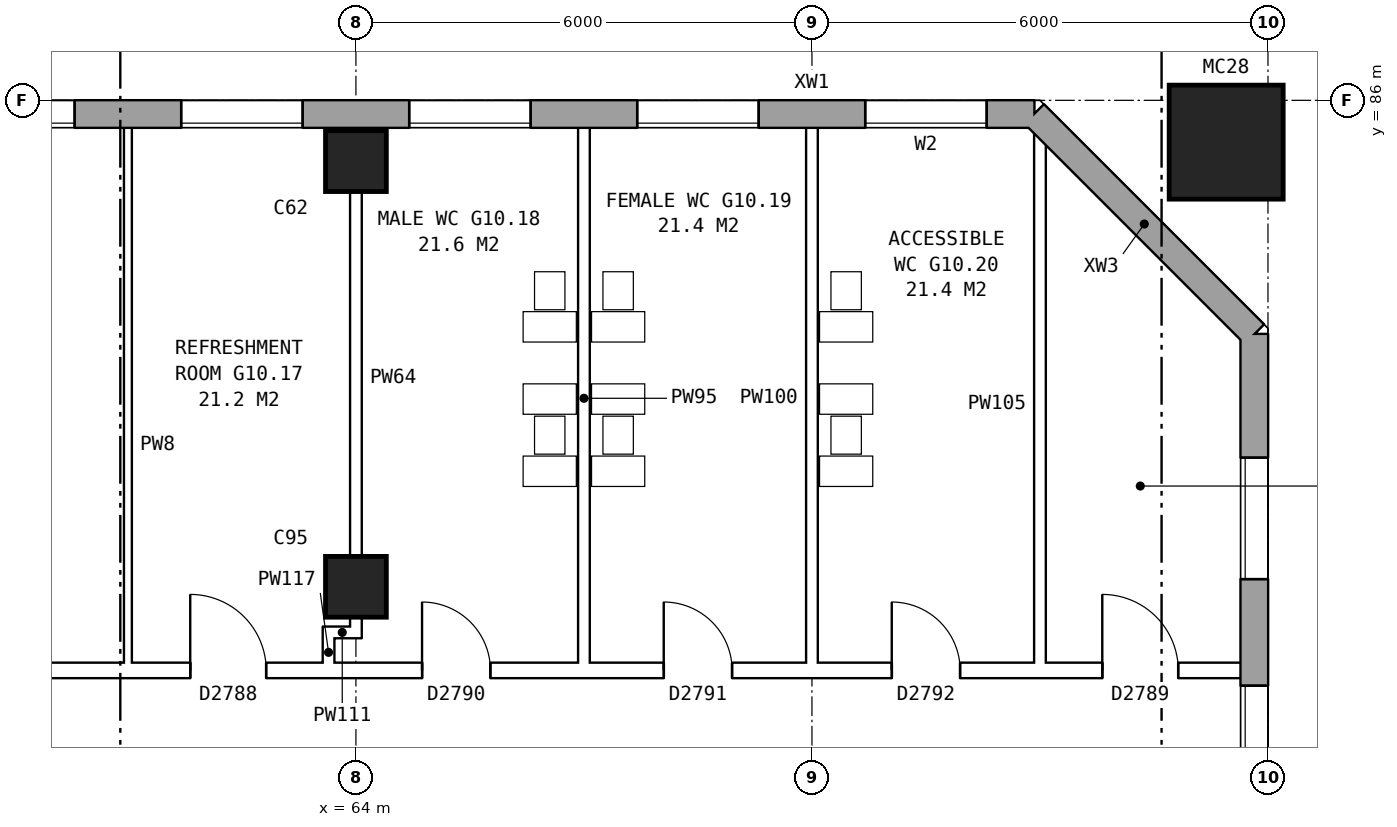
"""IFC4 building model, lengths in metres.
Left out: names, types, materials, properties, quantities, classifications, styles, units other than length and angle.
Written with IfcOpenShell. Run it as: python <this file> out.ifc"""

import sys

from ifc_helpers import new_model, si_unit, direction, frame, frame_2d, origin, origin_2d, place, context, subcontext, project, spatial, rectangle, hollow_rectangle, extrude, element, fill, save


model = new_model("IFC4")
c1 = context("Model", 3, precision=1e-05, world=origin(), true_north=direction((0.0, 1.0)))
c2 = subcontext(c1, "Body", "Model", "MODEL_VIEW")
j1 = project(units=[si_unit("LENGTHUNIT", "METRE"), si_unit("PLANEANGLEUNIT", "RADIAN")], contexts=[c1])
p1 = place(None, origin())
s1 = spatial("IfcSite", under=j1, at=p1, CompositionType="ELEMENT")
p2 = place(p1, origin())
s2 = spatial("IfcBuilding", under=s1, at=p2, CompositionType="ELEMENT")
p3 = place(p2, frame((0.0, 0.0, 38.1)))
s3 = spatial("IfcBuildingStorey", under=s2, at=p3, CompositionType="ELEMENT", Elevation=38.1)
for number, where, z_axis, x_axis in (
    (1, (64.0, 79.6, 0.0), (0.0, 0.0, 1.0), (1.0, 0.0, 0.0)),
    (2, (64.0, 85.2, 0.0), (0.0, 0.0, 1.0), (1.0, 0.0, 0.0)),
):
    element("IfcColumn", number, at=place(p3, frame(where, z_axis=z_axis, x_axis=x_axis)), inside=s3, PredefinedType="COLUMN", context=c2, shape_type="SweptSolid", body=[
        extrude(rectangle(XDim=0.8, YDim=0.8, at=origin_2d()), origin(), (0.0, 0.0, 1.0), 5.6),
    ])
p4 = place(p3, frame((75.45, 85.45, 0.0), z_axis=(0.0, 0.0, 1.0), x_axis=(1.0, 0.0, 0.0)))
e3 = element("IfcColumn", 3, at=p4, inside=s3, PredefinedType="COLUMN", context=c2, shape_type="SweptSolid", body=[
    extrude(hollow_rectangle(XDim=1.5, YDim=1.5, WallThickness=0.08, at=origin_2d()), origin(), (0.0, 0.0, 1.0), 6.2),
])
p5 = place(p3, frame((75.82, 57.075, 0.0), z_axis=(0.0, 0.0, 1.0), x_axis=(0.0, 1.0, 0.0)))
e4 = element("IfcWall", 4, at=p5, inside=s3, PredefinedType="STANDARD", context=c2, shape_type="SweptSolid", body=[
    extrude(rectangle(XDim=25.851, YDim=0.36, at=frame_2d((12.925, 0.0))), origin(), (0.0, 0.0, 1.0), 5.6),
])
p6 = place(p5, frame((1.625, 0.0, 0.15)))
e5 = element("IfcOpeningElement", 5, at=p6, cuts=e4, PredefinedType="OPENING", context=c2, shape_type="SweptSolid", body=[
    extrude(rectangle(XDim=1.6, YDim=2.4, at=frame_2d((0.8, 1.2))), frame((0.0, 0.19, 0.0), z_axis=(0.0, -1.0, 0.0), x_axis=(1.0, 0.0, 0.0)), (0.0, 0.0, 1.0), 0.38),
])
p7 = place(p5, frame((4.625, 0.0, 0.15)))
e6 = element("IfcOpeningElement", 6, at=p7, cuts=e4, PredefinedType="OPENING", context=c2, shape_type="SweptSolid", body=[
    extrude(rectangle(XDim=1.6, YDim=2.4, at=frame_2d((0.8, 1.2))), frame((0.0, 0.19, 0.0), z_axis=(0.0, -1.0, 0.0), x_axis=(1.0, 0.0, 0.0)), (0.0, 0.0, 1.0), 0.38),
])
p8 = place(p5, frame((19.625, 0.0, 0.15)))
e7 = element("IfcOpeningElement", 7, at=p8, cuts=e4, PredefinedType="OPENING", context=c2, shape_type="SweptSolid", body=[
    extrude(rectangle(XDim=1.6, YDim=2.4, at=frame_2d((0.8, 1.2))), frame((0.0, 0.19, 0.0), z_axis=(0.0, -1.0, 0.0), x_axis=(1.0, 0.0, 0.0)), (0.0, 0.0, 1.0), 0.38),
])
p9 = place(p5, frame((22.625, 0.0, 0.15)))
e8 = element("IfcOpeningElement", 8, at=p9, cuts=e4, PredefinedType="OPENING", context=c2, shape_type="SweptSolid", body=[
    extrude(rectangle(XDim=1.6, YDim=2.4, at=frame_2d((0.8, 1.2))), frame((0.0, 0.19, 0.0), z_axis=(0.0, -1.0, 0.0), x_axis=(1.0, 0.0, 0.0)), (0.0, 0.0, 1.0), 0.38),
])
p10 = place(p3, frame((75.82, 82.925, 0.0), z_axis=(0.0, 0.0, 1.0), x_axis=(-0.707106781187, 0.707106781187, 0.0)))
e9 = element("IfcWall", 9, at=p10, inside=s3, PredefinedType="STANDARD", context=c2, shape_type="SweptSolid", body=[
    extrude(rectangle(XDim=4.094, YDim=0.36, at=frame_2d((2.047, 0.0))), origin(), (0.0, 0.0, 1.0), 5.6),
])
p11 = place(p3, frame((72.925, 85.82, 0.0), z_axis=(0.0, 0.0, 1.0), x_axis=(-1.0, 0.0, 0.0)))
e10 = element("IfcWall", 10, at=p11, inside=s3, PredefinedType="STANDARD", context=c2, shape_type="SweptSolid", body=[
    extrude(rectangle(XDim=48.351, YDim=0.36, at=frame_2d((24.175, 0.0))), origin(), (0.0, 0.0, 1.0), 5.6),
])
p12 = place(p11, frame((0.625, 0.0, 0.15)))
e11 = element("IfcOpeningElement", 11, at=p12, cuts=e10, PredefinedType="OPENING", context=c2, shape_type="SweptSolid", body=[
    extrude(rectangle(XDim=1.6, YDim=2.4, at=frame_2d((0.8, 1.2))), frame((0.0, 0.19, 0.0), z_axis=(0.0, -1.0, 0.0), x_axis=(1.0, 0.0, 0.0)), (0.0, 0.0, 1.0), 0.38),
])
p13 = place(p11, frame((3.625, 0.0, 0.15)))
e12 = element("IfcOpeningElement", 12, at=p13, cuts=e10, PredefinedType="OPENING", context=c2, shape_type="SweptSolid", body=[
    extrude(rectangle(XDim=1.6, YDim=2.4, at=frame_2d((0.8, 1.2))), frame((0.0, 0.19, 0.0), z_axis=(0.0, -1.0, 0.0), x_axis=(1.0, 0.0, 0.0)), (0.0, 0.0, 1.0), 0.38),
])
p14 = place(p11, frame((6.625, 0.0, 0.15)))
e13 = element("IfcOpeningElement", 13, at=p14, cuts=e10, PredefinedType="OPENING", context=c2, shape_type="SweptSolid", body=[
    extrude(rectangle(XDim=1.6, YDim=2.4, at=frame_2d((0.8, 1.2))), frame((0.0, 0.19, 0.0), z_axis=(0.0, -1.0, 0.0), x_axis=(1.0, 0.0, 0.0)), (0.0, 0.0, 1.0), 0.38),
])
p15 = place(p11, frame((9.625, 0.0, 0.15)))
e14 = element("IfcOpeningElement", 14, at=p15, cuts=e10, PredefinedType="OPENING", context=c2, shape_type="SweptSolid", body=[
    extrude(rectangle(XDim=1.6, YDim=2.4, at=frame_2d((0.8, 1.2))), frame((0.0, 0.19, 0.0), z_axis=(0.0, -1.0, 0.0), x_axis=(1.0, 0.0, 0.0)), (0.0, 0.0, 1.0), 0.38),
])
p16 = place(p11, frame((12.625, 0.0, 0.15)))
e15 = element("IfcOpeningElement", 15, at=p16, cuts=e10, PredefinedType="OPENING", context=c2, shape_type="SweptSolid", body=[
    extrude(rectangle(XDim=1.6, YDim=2.4, at=frame_2d((0.8, 1.2))), frame((0.0, 0.19, 0.0), z_axis=(0.0, -1.0, 0.0), x_axis=(1.0, 0.0, 0.0)), (0.0, 0.0, 1.0), 0.38),
])
p17 = place(p11, frame((15.625, 0.0, 0.15)))
e16 = element("IfcOpeningElement", 16, at=p17, cuts=e10, PredefinedType="OPENING", context=c2, shape_type="SweptSolid", body=[
    extrude(rectangle(XDim=1.6, YDim=2.4, at=frame_2d((0.8, 1.2))), frame((0.0, 0.19, 0.0), z_axis=(0.0, -1.0, 0.0), x_axis=(1.0, 0.0, 0.0)), (0.0, 0.0, 1.0), 0.38),
])
p18 = place(p11, frame((18.625, 0.0, 0.15)))
e17 = element("IfcOpeningElement", 17, at=p18, cuts=e10, PredefinedType="OPENING", context=c2, shape_type="SweptSolid", body=[
    extrude(rectangle(XDim=1.6, YDim=2.4, at=frame_2d((0.8, 1.2))), frame((0.0, 0.19, 0.0), z_axis=(0.0, -1.0, 0.0), x_axis=(1.0, 0.0, 0.0)), (0.0, 0.0, 1.0), 0.38),
])
p19 = place(p11, frame((21.625, 0.0, 0.15)))
e18 = element("IfcOpeningElement", 18, at=p19, cuts=e10, PredefinedType="OPENING", context=c2, shape_type="SweptSolid", body=[
    extrude(rectangle(XDim=1.6, YDim=2.4, at=frame_2d((0.8, 1.2))), frame((0.0, 0.19, 0.0), z_axis=(0.0, -1.0, 0.0), x_axis=(1.0, 0.0, 0.0)), (0.0, 0.0, 1.0), 0.38),
])
p20 = place(p11, frame((24.625, 0.0, 0.15)))
e19 = element("IfcOpeningElement", 19, at=p20, cuts=e10, PredefinedType="OPENING", context=c2, shape_type="SweptSolid", body=[
    extrude(rectangle(XDim=1.6, YDim=2.4, at=frame_2d((0.8, 1.2))), frame((0.0, 0.19, 0.0), z_axis=(0.0, -1.0, 0.0), x_axis=(1.0, 0.0, 0.0)), (0.0, 0.0, 1.0), 0.38),
])
p21 = place(p11, frame((27.625, 0.0, 0.15)))
e20 = element("IfcOpeningElement", 20, at=p21, cuts=e10, PredefinedType="OPENING", context=c2, shape_type="SweptSolid", body=[
    extrude(rectangle(XDim=1.6, YDim=2.4, at=frame_2d((0.8, 1.2))), frame((0.0, 0.19, 0.0), z_axis=(0.0, -1.0, 0.0), x_axis=(1.0, 0.0, 0.0)), (0.0, 0.0, 1.0), 0.38),
])
p22 = place(p11, frame((30.625, 0.0, 0.15)))
e21 = element("IfcOpeningElement", 21, at=p22, cuts=e10, PredefinedType="OPENING", context=c2, shape_type="SweptSolid", body=[
    extrude(rectangle(XDim=1.6, YDim=2.4, at=frame_2d((0.8, 1.2))), frame((0.0, 0.19, 0.0), z_axis=(0.0, -1.0, 0.0), x_axis=(1.0, 0.0, 0.0)), (0.0, 0.0, 1.0), 0.38),
])
p23 = place(p11, frame((33.625, 0.0, 0.15)))
e22 = element("IfcOpeningElement", 22, at=p23, cuts=e10, PredefinedType="OPENING", context=c2, shape_type="SweptSolid", body=[
    extrude(rectangle(XDim=1.6, YDim=2.4, at=frame_2d((0.8, 1.2))), frame((0.0, 0.19, 0.0), z_axis=(0.0, -1.0, 0.0), x_axis=(1.0, 0.0, 0.0)), (0.0, 0.0, 1.0), 0.38),
])
p24 = place(p11, frame((36.625, 0.0, 0.15)))
e23 = element("IfcOpeningElement", 23, at=p24, cuts=e10, PredefinedType="OPENING", context=c2, shape_type="SweptSolid", body=[
    extrude(rectangle(XDim=1.6, YDim=2.4, at=frame_2d((0.8, 1.2))), frame((0.0, 0.19, 0.0), z_axis=(0.0, -1.0, 0.0), x_axis=(1.0, 0.0, 0.0)), (0.0, 0.0, 1.0), 0.38),
])
p25 = place(p11, frame((39.625, 0.0, 0.15)))
e24 = element("IfcOpeningElement", 24, at=p25, cuts=e10, PredefinedType="OPENING", context=c2, shape_type="SweptSolid", body=[
    extrude(rectangle(XDim=1.6, YDim=2.4, at=frame_2d((0.8, 1.2))), frame((0.0, 0.19, 0.0), z_axis=(0.0, -1.0, 0.0), x_axis=(1.0, 0.0, 0.0)), (0.0, 0.0, 1.0), 0.38),
])
p26 = place(p11, frame((42.625, 0.0, 0.15)))
e25 = element("IfcOpeningElement", 25, at=p26, cuts=e10, PredefinedType="OPENING", context=c2, shape_type="SweptSolid", body=[
    extrude(rectangle(XDim=1.6, YDim=2.4, at=frame_2d((0.8, 1.2))), frame((0.0, 0.19, 0.0), z_axis=(0.0, -1.0, 0.0), x_axis=(1.0, 0.0, 0.0)), (0.0, 0.0, 1.0), 0.38),
])
p27 = place(p11, frame((45.625, 0.0, 0.15)))
e26 = element("IfcOpeningElement", 26, at=p27, cuts=e10, PredefinedType="OPENING", context=c2, shape_type="SweptSolid", body=[
    extrude(rectangle(XDim=1.6, YDim=2.4, at=frame_2d((0.8, 1.2))), frame((0.0, 0.19, 0.0), z_axis=(0.0, -1.0, 0.0), x_axis=(1.0, 0.0, 0.0)), (0.0, 0.0, 1.0), 0.38),
])
p28 = place(p3, frame((24.9, 78.5, 0.0), z_axis=(0.0, 0.0, 1.0), x_axis=(1.0, 0.0, 0.0)))
e27 = element("IfcWall", 27, at=p28, inside=s3, PredefinedType="PARTITIONING", context=c2, shape_type="SweptSolid", body=[
    extrude(rectangle(XDim=50.86, YDim=0.2, at=frame_2d((25.43, 0.0))), origin(), (0.0, 0.0, 1.0), 5.6),
])
p29 = place(p28, frame((3.5, 0.0, 0.0)))
e28 = element("IfcOpeningElement", 28, at=p29, cuts=e27, PredefinedType="OPENING", context=c2, shape_type="SweptSolid", body=[
    extrude(rectangle(XDim=1.0, YDim=2.1, at=frame_2d((0.5, 1.05))), frame((0.0, 0.11, 0.0), z_axis=(0.0, -1.0, 0.0), x_axis=(1.0, 0.0, 0.0)), (0.0, 0.0, 1.0), 0.22),
])
p30 = place(p28, frame((8.6, 0.0, 0.0)))
e29 = element("IfcOpeningElement", 29, at=p30, cuts=e27, PredefinedType="OPENING", context=c2, shape_type="SweptSolid", body=[
    extrude(rectangle(XDim=1.0, YDim=2.1, at=frame_2d((0.5, 1.05))), frame((0.0, 0.11, 0.0), z_axis=(0.0, -1.0, 0.0), x_axis=(1.0, 0.0, 0.0)), (0.0, 0.0, 1.0), 0.22),
])
p31 = place(p28, frame((15.5, 0.0, 0.0)))
e30 = element("IfcOpeningElement", 30, at=p31, cuts=e27, PredefinedType="OPENING", context=c2, shape_type="SweptSolid", body=[
    extrude(rectangle(XDim=1.0, YDim=2.1, at=frame_2d((0.5, 1.05))), frame((0.0, 0.11, 0.0), z_axis=(0.0, -1.0, 0.0), x_axis=(1.0, 0.0, 0.0)), (0.0, 0.0, 1.0), 0.22),
])
p32 = place(p28, frame((20.6, 0.0, 0.0)))
e31 = element("IfcOpeningElement", 31, at=p32, cuts=e27, PredefinedType="OPENING", context=c2, shape_type="SweptSolid", body=[
    extrude(rectangle(XDim=1.0, YDim=2.1, at=frame_2d((0.5, 1.05))), frame((0.0, 0.11, 0.0), z_axis=(0.0, -1.0, 0.0), x_axis=(1.0, 0.0, 0.0)), (0.0, 0.0, 1.0), 0.22),
])
p33 = place(p28, frame((27.5, 0.0, 0.0)))
e32 = element("IfcOpeningElement", 32, at=p33, cuts=e27, PredefinedType="OPENING", context=c2, shape_type="SweptSolid", body=[
    extrude(rectangle(XDim=1.0, YDim=2.1, at=frame_2d((0.5, 1.05))), frame((0.0, 0.11, 0.0), z_axis=(0.0, -1.0, 0.0), x_axis=(1.0, 0.0, 0.0)), (0.0, 0.0, 1.0), 0.22),
])
p34 = place(p28, frame((32.6, 0.0, 0.0)))
e33 = element("IfcOpeningElement", 33, at=p34, cuts=e27, PredefinedType="OPENING", context=c2, shape_type="SweptSolid", body=[
    extrude(rectangle(XDim=1.0, YDim=2.1, at=frame_2d((0.5, 1.05))), frame((0.0, 0.11, 0.0), z_axis=(0.0, -1.0, 0.0), x_axis=(1.0, 0.0, 0.0)), (0.0, 0.0, 1.0), 0.22),
])
p35 = place(p28, frame((36.92, 0.0, 0.0)))
e34 = element("IfcOpeningElement", 34, at=p35, cuts=e27, PredefinedType="OPENING", context=c2, shape_type="SweptSolid", body=[
    extrude(rectangle(XDim=1.0, YDim=2.1, at=frame_2d((0.5, 1.05))), frame((0.0, 0.11, 0.0), z_axis=(0.0, -1.0, 0.0), x_axis=(1.0, 0.0, 0.0)), (0.0, 0.0, 1.0), 0.22),
])
p36 = place(p28, frame((39.97, 0.0, 0.0)))
e35 = element("IfcOpeningElement", 35, at=p36, cuts=e27, PredefinedType="OPENING", context=c2, shape_type="SweptSolid", body=[
    extrude(rectangle(XDim=0.9, YDim=2.1, at=frame_2d((0.45, 1.05))), frame((0.0, 0.11, 0.0), z_axis=(0.0, -1.0, 0.0), x_axis=(1.0, 0.0, 0.0)), (0.0, 0.0, 1.0), 0.22),
])
p37 = place(p28, frame((43.15, 0.0, 0.0)))
e36 = element("IfcOpeningElement", 36, at=p37, cuts=e27, PredefinedType="OPENING", context=c2, shape_type="SweptSolid", body=[
    extrude(rectangle(XDim=0.9, YDim=2.1, at=frame_2d((0.45, 1.05))), frame((0.0, 0.11, 0.0), z_axis=(0.0, -1.0, 0.0), x_axis=(1.0, 0.0, 0.0)), (0.0, 0.0, 1.0), 0.22),
])
p38 = place(p28, frame((46.15, 0.0, 0.0)))
e37 = element("IfcOpeningElement", 37, at=p38, cuts=e27, PredefinedType="OPENING", context=c2, shape_type="SweptSolid", body=[
    extrude(rectangle(XDim=0.9, YDim=2.1, at=frame_2d((0.45, 1.05))), frame((0.0, 0.11, 0.0), z_axis=(0.0, -1.0, 0.0), x_axis=(1.0, 0.0, 0.0)), (0.0, 0.0, 1.0), 0.22),
])
p39 = place(p28, frame((48.92, 0.0, 0.0)))
e38 = element("IfcOpeningElement", 38, at=p39, cuts=e27, PredefinedType="OPENING", context=c2, shape_type="SweptSolid", body=[
    extrude(rectangle(XDim=1.0, YDim=2.1, at=frame_2d((0.5, 1.05))), frame((0.0, 0.11, 0.0), z_axis=(0.0, -1.0, 0.0), x_axis=(1.0, 0.0, 0.0)), (0.0, 0.0, 1.0), 0.22),
])
p40 = place(p3, frame((63.565, 79.0, 0.0), z_axis=(0.0, 0.0, 1.0), x_axis=(1.0, 0.0, 0.0)))
e39 = element("IfcWall", 39, at=p40, inside=s3, PredefinedType="PLUMBINGWALL", context=c2, shape_type="SweptSolid", body=[
    extrude(rectangle(XDim=0.51, YDim=0.15, at=frame_2d((0.255, 0.0))), origin(), (0.0, 0.0, 1.0), 5.6),
])
p41 = place(p3, frame((61.0, 78.4, 0.0), z_axis=(0.0, 0.0, 1.0), x_axis=(0.0, 1.0, 0.0)))
e40 = element("IfcWall", 40, at=p41, inside=s3, PredefinedType="PARTITIONING", context=c2, shape_type="SweptSolid", body=[
    extrude(rectangle(XDim=7.36, YDim=0.1, at=frame_2d((3.68, 0.0))), origin(), (0.0, 0.0, 1.0), 5.6),
])
p42 = place(p3, frame((63.64, 78.4, 0.0), z_axis=(0.0, 0.0, 1.0), x_axis=(0.0, 1.0, 0.0)))
e41 = element("IfcWall", 41, at=p42, inside=s3, PredefinedType="PLUMBINGWALL", context=c2, shape_type="SweptSolid", body=[
    extrude(rectangle(XDim=0.675, YDim=0.15, at=frame_2d((0.337, 0.0))), origin(), (0.0, 0.0, 1.0), 5.6),
])
p43 = place(p3, frame((64.0, 78.925, 0.0), z_axis=(0.0, 0.0, 1.0), x_axis=(0.0, 1.0, 0.0)))
e42 = element("IfcWall", 42, at=p43, inside=s3, PredefinedType="PLUMBINGWALL", context=c2, shape_type="SweptSolid", body=[
    extrude(rectangle(XDim=6.835, YDim=0.15, at=frame_2d((3.417, 0.0))), origin(), (0.0, 0.0, 1.0), 5.6),
])
for number, where, z_axis, x_axis in (
    (43, (67.0, 78.4, 0.0), (0.0, 0.0, 1.0), (0.0, 1.0, 0.0)),
    (44, (70.0, 78.4, 0.0), (0.0, 0.0, 1.0), (0.0, 1.0, 0.0)),
):
    element("IfcWall", number, at=place(p3, frame(where, z_axis=z_axis, x_axis=x_axis)), inside=s3, PredefinedType="PLUMBINGWALL", context=c2, shape_type="SweptSolid", body=[
        extrude(rectangle(XDim=7.36, YDim=0.15, at=frame_2d((3.68, 0.0))), origin(), (0.0, 0.0, 1.0), 5.6),
    ])
p44 = place(p3, frame((73.0, 78.4, 0.0), z_axis=(0.0, 0.0, 1.0), x_axis=(0.0, 1.0, 0.0)))
e45 = element("IfcWall", 45, at=p44, inside=s3, PredefinedType="PLUMBINGWALL", context=c2, shape_type="SweptSolid", body=[
    extrude(rectangle(XDim=7.211, YDim=0.15, at=frame_2d((3.605, 0.0))), origin(), (0.0, 0.0, 1.0), 5.6),
])
p45 = place(p8, origin())
e46 = element("IfcWindow", 46, at=p45, inside=s3, PartitioningType="SINGLE_PANEL", PredefinedType="WINDOW", context=c2, shape_type="SweptSolid", body=[
    extrude(rectangle(XDim=1.6, YDim=2.4, at=frame_2d((0.8, 1.2))), frame((0.0, 0.15, 0.0), z_axis=(0.0, -1.0, 0.0), x_axis=(1.0, 0.0, 0.0)), (0.0, 0.0, 1.0), 0.06),
])
fill(e7, e46)
p46 = place(p9, origin())
e47 = element("IfcWindow", 47, at=p46, inside=s3, PartitioningType="SINGLE_PANEL", PredefinedType="WINDOW", context=c2, shape_type="SweptSolid", body=[
    extrude(rectangle(XDim=1.6, YDim=2.4, at=frame_2d((0.8, 1.2))), frame((0.0, 0.15, 0.0), z_axis=(0.0, -1.0, 0.0), x_axis=(1.0, 0.0, 0.0)), (0.0, 0.0, 1.0), 0.06),
])
fill(e8, e47)
p47 = place(p12, origin())
e48 = element("IfcWindow", 48, at=p47, inside=s3, PartitioningType="SINGLE_PANEL", PredefinedType="WINDOW", context=c2, shape_type="SweptSolid", body=[
    extrude(rectangle(XDim=1.6, YDim=2.4, at=frame_2d((0.8, 1.2))), frame((0.0, 0.15, 0.0), z_axis=(0.0, -1.0, 0.0), x_axis=(1.0, 0.0, 0.0)), (0.0, 0.0, 1.0), 0.06),
])
fill(e11, e48)
p48 = place(p13, origin())
e49 = element("IfcWindow", 49, at=p48, inside=s3, PartitioningType="SINGLE_PANEL", PredefinedType="WINDOW", context=c2, shape_type="SweptSolid", body=[
    extrude(rectangle(XDim=1.6, YDim=2.4, at=frame_2d((0.8, 1.2))), frame((0.0, 0.15, 0.0), z_axis=(0.0, -1.0, 0.0), x_axis=(1.0, 0.0, 0.0)), (0.0, 0.0, 1.0), 0.06),
])
fill(e12, e49)
p49 = place(p14, origin())
e50 = element("IfcWindow", 50, at=p49, inside=s3, PartitioningType="SINGLE_PANEL", PredefinedType="WINDOW", context=c2, shape_type="SweptSolid", body=[
    extrude(rectangle(XDim=1.6, YDim=2.4, at=frame_2d((0.8, 1.2))), frame((0.0, 0.15, 0.0), z_axis=(0.0, -1.0, 0.0), x_axis=(1.0, 0.0, 0.0)), (0.0, 0.0, 1.0), 0.06),
])
fill(e13, e50)
p50 = place(p15, origin())
e51 = element("IfcWindow", 51, at=p50, inside=s3, PartitioningType="SINGLE_PANEL", PredefinedType="WINDOW", context=c2, shape_type="SweptSolid", body=[
    extrude(rectangle(XDim=1.6, YDim=2.4, at=frame_2d((0.8, 1.2))), frame((0.0, 0.15, 0.0), z_axis=(0.0, -1.0, 0.0), x_axis=(1.0, 0.0, 0.0)), (0.0, 0.0, 1.0), 0.06),
])
fill(e14, e51)
p51 = place(p16, origin())
e52 = element("IfcWindow", 52, at=p51, inside=s3, PartitioningType="SINGLE_PANEL", PredefinedType="WINDOW", context=c2, shape_type="SweptSolid", body=[
    extrude(rectangle(XDim=1.6, YDim=2.4, at=frame_2d((0.8, 1.2))), frame((0.0, 0.15, 0.0), z_axis=(0.0, -1.0, 0.0), x_axis=(1.0, 0.0, 0.0)), (0.0, 0.0, 1.0), 0.06),
])
fill(e15, e52)
p52 = place(p35, origin())
e53 = element("IfcDoor", 53, at=p52, inside=s3, OperationType="SINGLE_SWING_LEFT", PredefinedType="DOOR", context=c2, shape_type="SweptSolid", body=[
    extrude(rectangle(XDim=1.0, YDim=2.1, at=frame_2d((0.5, 1.05))), frame((0.0, 0.025, 0.0), z_axis=(0.0, -1.0, 0.0), x_axis=(1.0, 0.0, 0.0)), (0.0, 0.0, 1.0), 0.05),
])
fill(e34, e53)
p53 = place(p36, origin())
e54 = element("IfcDoor", 54, at=p53, inside=s3, OperationType="SINGLE_SWING_LEFT", PredefinedType="DOOR", context=c2, shape_type="SweptSolid", body=[
    extrude(rectangle(XDim=0.9, YDim=2.1, at=frame_2d((0.45, 1.05))), frame((0.0, 0.025, 0.0), z_axis=(0.0, -1.0, 0.0), x_axis=(1.0, 0.0, 0.0)), (0.0, 0.0, 1.0), 0.05),
])
fill(e35, e54)
p54 = place(p37, origin())
e55 = element("IfcDoor", 55, at=p54, inside=s3, OperationType="SINGLE_SWING_LEFT", PredefinedType="DOOR", context=c2, shape_type="SweptSolid", body=[
    extrude(rectangle(XDim=0.9, YDim=2.1, at=frame_2d((0.45, 1.05))), frame((0.0, 0.025, 0.0), z_axis=(0.0, -1.0, 0.0), x_axis=(1.0, 0.0, 0.0)), (0.0, 0.0, 1.0), 0.05),
])
fill(e36, e55)
p55 = place(p38, origin())
e56 = element("IfcDoor", 56, at=p55, inside=s3, OperationType="SINGLE_SWING_LEFT", PredefinedType="DOOR", context=c2, shape_type="SweptSolid", body=[
    extrude(rectangle(XDim=0.9, YDim=2.1, at=frame_2d((0.45, 1.05))), frame((0.0, 0.025, 0.0), z_axis=(0.0, -1.0, 0.0), x_axis=(1.0, 0.0, 0.0)), (0.0, 0.0, 1.0), 0.05),
])
fill(e37, e56)
p56 = place(p39, origin())
e57 = element("IfcDoor", 57, at=p56, inside=s3, OperationType="SINGLE_SWING_LEFT", PredefinedType="DOOR", context=c2, shape_type="SweptSolid", body=[
    extrude(rectangle(XDim=1.0, YDim=2.1, at=frame_2d((0.5, 1.05))), frame((0.0, 0.025, 0.0), z_axis=(0.0, -1.0, 0.0), x_axis=(1.0, 0.0, 0.0)), (0.0, 0.0, 1.0), 0.05),
])
fill(e38, e57)
save(model, sys.argv[1])
